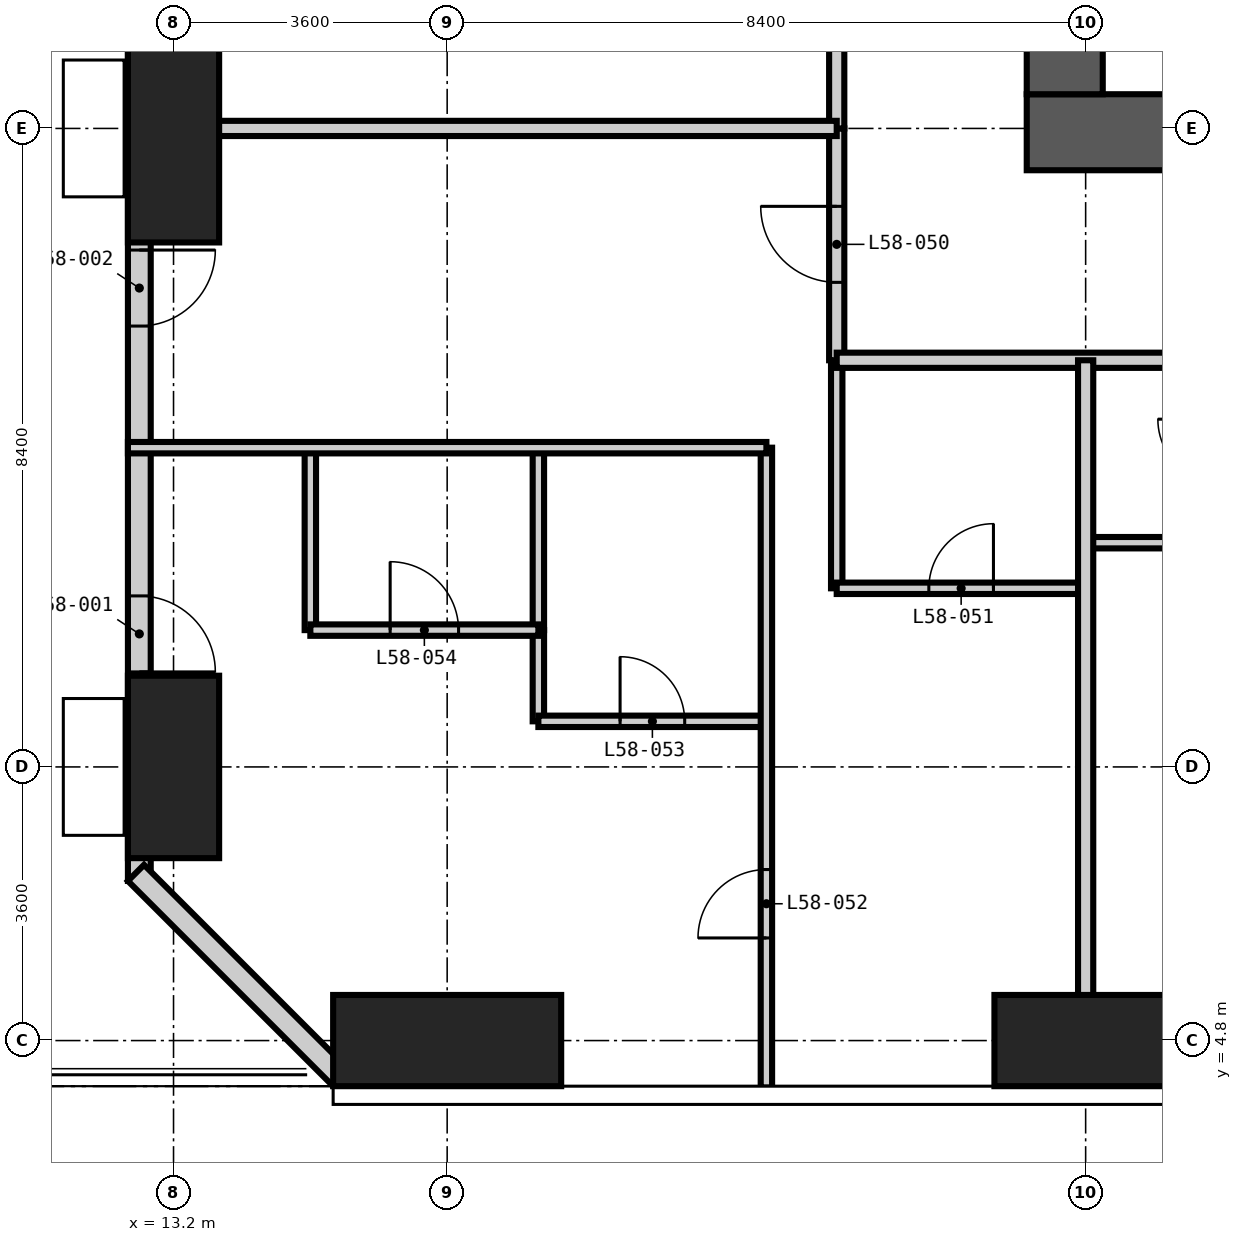
"""IFC4 building model, lengths in metres.
Left out: names, types, materials, properties, quantities, classifications, styles, units other than length and angle.
Written with IfcOpenShell. Run it as: python <this file> out.ifc"""

import sys

from ifc_helpers import new_model, si_unit, direction, frame, frame_2d, origin, origin_2d, place, context, subcontext, project, spatial, rectangle, extrude, element, fill, save


model = new_model("IFC4")
c1 = context("Model", 3, precision=1e-05, world=origin(), true_north=direction((0.0, 1.0)))
c2 = subcontext(c1, "Body", "Model", "MODEL_VIEW")
j1 = project(units=[si_unit("LENGTHUNIT", "METRE"), si_unit("PLANEANGLEUNIT", "RADIAN")], contexts=[c1])
p1 = place(None, origin())
s1 = spatial("IfcSite", under=j1, at=p1, CompositionType="ELEMENT")
p2 = place(p1, origin())
s2 = spatial("IfcBuilding", under=s1, at=p2, CompositionType="ELEMENT")
p3 = place(p2, frame((0.0, 0.0, 225.6)))
s3 = spatial("IfcBuildingStorey", under=s2, at=p3, CompositionType="ELEMENT", Elevation=225.6)
p4 = place(p3, frame((13.2, 8.4, -0.35), z_axis=(0.0, 0.0, 1.0), x_axis=(1.0, 0.0, 0.0)))
e1 = element("IfcColumn", 1, at=p4, inside=s3, PredefinedType="COLUMN", context=c2, shape_type="SweptSolid", body=[
    extrude(rectangle(XDim=1.2, YDim=2.4, at=origin_2d()), origin(), (0.0, 0.0, 1.0), 3.9),
])
p5 = place(p3, frame((13.2, 16.8, -0.35), z_axis=(0.0, 0.0, 1.0), x_axis=(1.0, 0.0, 0.0)))
e2 = element("IfcColumn", 2, at=p5, inside=s3, PredefinedType="COLUMN", context=c2, shape_type="SweptSolid", body=[
    extrude(rectangle(XDim=1.2, YDim=3.0, at=origin_2d()), origin(), (0.0, 0.0, 1.0), 3.9),
])
p6 = place(p3, frame((16.8, 4.8, -0.35), z_axis=(0.0, 0.0, 1.0), x_axis=(1.0, 0.0, 0.0)))
e3 = element("IfcColumn", 3, at=p6, inside=s3, PredefinedType="COLUMN", context=c2, shape_type="SweptSolid", body=[
    extrude(rectangle(XDim=3.0, YDim=1.2, at=origin_2d()), origin(), (0.0, 0.0, 1.0), 3.9),
])
p7 = place(p3, frame((25.2, 4.8, -0.35), z_axis=(0.0, 0.0, 1.0), x_axis=(1.0, 0.0, 0.0)))
e4 = element("IfcColumn", 4, at=p7, inside=s3, PredefinedType="COLUMN", context=c2, shape_type="SweptSolid", body=[
    extrude(rectangle(XDim=2.4, YDim=1.2, at=origin_2d()), origin(), (0.0, 0.0, 1.0), 3.9),
])
p8 = place(p3, frame((24.425, 16.75, -0.35), z_axis=(0.0, 0.0, 1.0), x_axis=(1.0, 0.0, 0.0)))
e5 = element("IfcWall", 5, at=p8, inside=s3, PredefinedType="SHEAR", context=c2, shape_type="SweptSolid", body=[
    extrude(rectangle(XDim=18.125, YDim=1.0, at=frame_2d((9.062, 0.0))), origin(), (0.0, 0.0, 1.0), 3.9),
])
p9 = place(p8, frame((4.475, 0.0, 0.35)))
e6 = element("IfcOpeningElement", 6, at=p9, cuts=e5, PredefinedType="OPENING", context=c2, shape_type="SweptSolid", body=[
    extrude(rectangle(XDim=1.0, YDim=2.1, at=frame_2d((0.5, 1.05))), frame((0.0, 0.51, 0.0), z_axis=(0.0, -1.0, 0.0), x_axis=(1.0, 0.0, 0.0)), (0.0, 0.0, 1.0), 1.02),
])
p10 = place(p8, frame((10.775, 0.0, 0.35)))
e7 = element("IfcOpeningElement", 7, at=p10, cuts=e5, PredefinedType="OPENING", context=c2, shape_type="SweptSolid", body=[
    extrude(rectangle(XDim=1.0, YDim=2.1, at=frame_2d((0.5, 1.05))), frame((0.0, 0.51, 0.0), z_axis=(0.0, -1.0, 0.0), x_axis=(1.0, 0.0, 0.0)), (0.0, 0.0, 1.0), 1.02),
])
p11 = place(p3, frame((24.925, 41.55, -0.35), z_axis=(0.0, 0.0, 1.0), x_axis=(0.0, -1.0, 0.0)))
e8 = element("IfcWall", 8, at=p11, inside=s3, PredefinedType="SHEAR", context=c2, shape_type="SweptSolid", body=[
    extrude(rectangle(XDim=24.3, YDim=1.0, at=frame_2d((12.15, 0.0))), origin(), (0.0, 0.0, 1.0), 3.9),
])
p12 = place(p11, frame((11.65, 0.0, 0.35)))
e9 = element("IfcOpeningElement", 9, at=p12, cuts=e8, PredefinedType="OPENING", context=c2, shape_type="SweptSolid", body=[
    extrude(rectangle(XDim=1.0, YDim=2.1, at=frame_2d((0.5, 1.05))), frame((0.0, 0.51, 0.0), z_axis=(0.0, -1.0, 0.0), x_axis=(1.0, 0.0, 0.0)), (0.0, 0.0, 1.0), 1.02),
])
p13 = place(p3, frame((12.75, 51.9, 0.0), z_axis=(0.0, 0.0, 1.0), x_axis=(0.0, -1.0, 0.0)))
e10 = element("IfcWall", 10, at=p13, inside=s3, PredefinedType="SOLIDWALL", context=c2, shape_type="SweptSolid", body=[
    extrude(rectangle(XDim=45.0, YDim=0.3, at=frame_2d((22.5, 0.0))), origin(), (0.0, 0.0, 1.0), 3.1),
])
p14 = place(p13, frame((41.25, 0.0, 0.0)))
e11 = element("IfcOpeningElement", 11, at=p14, cuts=e10, PredefinedType="OPENING", context=c2, shape_type="SweptSolid", body=[
    extrude(rectangle(XDim=1.0, YDim=2.4, at=frame_2d((0.5, 1.2))), frame((0.0, 0.16, 0.0), z_axis=(0.0, -1.0, 0.0), x_axis=(1.0, 0.0, 0.0)), (0.0, 0.0, 1.0), 0.32),
])
p15 = place(p13, frame((36.7, 0.0, 0.0)))
e12 = element("IfcOpeningElement", 12, at=p15, cuts=e10, PredefinedType="OPENING", context=c2, shape_type="SweptSolid", body=[
    extrude(rectangle(XDim=1.0, YDim=2.4, at=frame_2d((0.5, 1.2))), frame((0.0, 0.16, 0.0), z_axis=(0.0, -1.0, 0.0), x_axis=(1.0, 0.0, 0.0)), (0.0, 0.0, 1.0), 0.32),
])
p16 = place(p13, frame((30.4, 0.0, 0.0)))
e13 = element("IfcOpeningElement", 13, at=p16, cuts=e10, PredefinedType="OPENING", context=c2, shape_type="SweptSolid", body=[
    extrude(rectangle(XDim=1.0, YDim=2.4, at=frame_2d((0.5, 1.2))), frame((0.0, 0.16, 0.0), z_axis=(0.0, -1.0, 0.0), x_axis=(1.0, 0.0, 0.0)), (0.0, 0.0, 1.0), 0.32),
])
p17 = place(p13, frame((31.7, 0.0, 0.6)))
e14 = element("IfcOpeningElement", 14, at=p17, cuts=e10, PredefinedType="OPENING", context=c2, shape_type="SweptSolid", body=[
    extrude(rectangle(XDim=1.8, YDim=2.1, at=frame_2d((0.9, 1.05))), frame((0.0, 0.16, 0.0), z_axis=(0.0, -1.0, 0.0), x_axis=(1.0, 0.0, 0.0)), (0.0, 0.0, 1.0), 0.32),
])
p18 = place(p13, frame((28.0, 0.0, 0.6)))
e15 = element("IfcOpeningElement", 15, at=p18, cuts=e10, PredefinedType="OPENING", context=c2, shape_type="SweptSolid", body=[
    extrude(rectangle(XDim=1.8, YDim=2.1, at=frame_2d((0.9, 1.05))), frame((0.0, 0.16, 0.0), z_axis=(0.0, -1.0, 0.0), x_axis=(1.0, 0.0, 0.0)), (0.0, 0.0, 1.0), 0.32),
])
p19 = place(p13, frame((24.1, 0.0, 0.0)))
e16 = element("IfcOpeningElement", 16, at=p19, cuts=e10, PredefinedType="OPENING", context=c2, shape_type="SweptSolid", body=[
    extrude(rectangle(XDim=1.0, YDim=2.4, at=frame_2d((0.5, 1.2))), frame((0.0, 0.16, 0.0), z_axis=(0.0, -1.0, 0.0), x_axis=(1.0, 0.0, 0.0)), (0.0, 0.0, 1.0), 0.32),
])
p20 = place(p13, frame((19.9, 0.0, 0.0)))
e17 = element("IfcOpeningElement", 17, at=p20, cuts=e10, PredefinedType="OPENING", context=c2, shape_type="SweptSolid", body=[
    extrude(rectangle(XDim=1.0, YDim=2.4, at=frame_2d((0.5, 1.2))), frame((0.0, 0.16, 0.0), z_axis=(0.0, -1.0, 0.0), x_axis=(1.0, 0.0, 0.0)), (0.0, 0.0, 1.0), 0.32),
])
p21 = place(p13, frame((15.7, 0.0, 0.0)))
e18 = element("IfcOpeningElement", 18, at=p21, cuts=e10, PredefinedType="OPENING", context=c2, shape_type="SweptSolid", body=[
    extrude(rectangle(XDim=1.0, YDim=2.4, at=frame_2d((0.5, 1.2))), frame((0.0, 0.16, 0.0), z_axis=(0.0, -1.0, 0.0), x_axis=(1.0, 0.0, 0.0)), (0.0, 0.0, 1.0), 0.32),
])
p22 = place(p13, frame((11.5, 0.0, 0.0)))
e19 = element("IfcOpeningElement", 19, at=p22, cuts=e10, PredefinedType="OPENING", context=c2, shape_type="SweptSolid", body=[
    extrude(rectangle(XDim=1.0, YDim=2.4, at=frame_2d((0.5, 1.2))), frame((0.0, 0.16, 0.0), z_axis=(0.0, -1.0, 0.0), x_axis=(1.0, 0.0, 0.0)), (0.0, 0.0, 1.0), 0.32),
])
p23 = place(p13, frame((7.3, 0.0, 0.0)))
e20 = element("IfcOpeningElement", 20, at=p23, cuts=e10, PredefinedType="OPENING", context=c2, shape_type="SweptSolid", body=[
    extrude(rectangle(XDim=1.0, YDim=2.4, at=frame_2d((0.5, 1.2))), frame((0.0, 0.16, 0.0), z_axis=(0.0, -1.0, 0.0), x_axis=(1.0, 0.0, 0.0)), (0.0, 0.0, 1.0), 0.32),
])
p24 = place(p13, frame((2.75, 0.0, 0.0)))
e21 = element("IfcOpeningElement", 21, at=p24, cuts=e10, PredefinedType="OPENING", context=c2, shape_type="SweptSolid", body=[
    extrude(rectangle(XDim=1.0, YDim=2.4, at=frame_2d((0.5, 1.2))), frame((0.0, 0.16, 0.0), z_axis=(0.0, -1.0, 0.0), x_axis=(1.0, 0.0, 0.0)), (0.0, 0.0, 1.0), 0.32),
])
p25 = place(p3, frame((12.706, 7.006, 0.0), z_axis=(0.0, 0.0, 1.0), x_axis=(0.707074812166, -0.707138748762, 0.0)))
e22 = element("IfcWall", 22, at=p25, inside=s3, PredefinedType="SOLIDWALL", context=c2, shape_type="SweptSolid", body=[
    extrude(rectangle(XDim=3.818, YDim=0.3, at=frame_2d((1.909, 0.0))), origin(), (0.0, 0.0, 1.0), 3.55),
])
p26 = place(p3, frame((18.0, 9.0, 0.0), z_axis=(0.0, 0.0, 1.0), x_axis=(0.0, 1.0, 0.0)))
e23 = element("IfcWall", 23, at=p26, inside=s3, PredefinedType="PARTITIONING", context=c2, shape_type="SweptSolid", body=[
    extrude(rectangle(XDim=1.2, YDim=0.15, at=frame_2d((0.6, 0.0))), origin(), (0.0, 0.0, 1.0), 3.55),
])
p27 = place(p3, frame((21.925, 10.75, 0.0), z_axis=(0.0, 0.0, 1.0), x_axis=(0.0, 1.0, 0.0)))
e24 = element("IfcWall", 24, at=p27, inside=s3, PredefinedType="PARTITIONING", context=c2, shape_type="SweptSolid", body=[
    extrude(rectangle(XDim=3.0, YDim=0.15, at=frame_2d((1.5, 0.0))), origin(), (0.0, 0.0, 1.0), 3.55),
])
p28 = place(p3, frame((18.0, 9.0, 0.0), z_axis=(0.0, 0.0, 1.0), x_axis=(1.0, 0.0, 0.0)))
e25 = element("IfcWall", 25, at=p28, inside=s3, PredefinedType="PARTITIONING", context=c2, shape_type="SweptSolid", body=[
    extrude(rectangle(XDim=3.0, YDim=0.15, at=frame_2d((1.5, 0.0))), origin(), (0.0, 0.0, 1.0), 3.55),
])
p29 = place(p28, frame((1.075, 0.0, 0.0)))
e26 = element("IfcOpeningElement", 26, at=p29, cuts=e25, PredefinedType="OPENING", context=c2, shape_type="SweptSolid", body=[
    extrude(rectangle(XDim=0.85, YDim=2.1, at=frame_2d((0.425, 1.05))), frame((0.0, 0.085, 0.0), z_axis=(0.0, -1.0, 0.0), x_axis=(1.0, 0.0, 0.0)), (0.0, 0.0, 1.0), 0.17),
])
p30 = place(p3, frame((21.925, 10.75, 0.0), z_axis=(0.0, 0.0, 1.0), x_axis=(1.0, 0.0, 0.0)))
e27 = element("IfcWall", 27, at=p30, inside=s3, PredefinedType="PARTITIONING", context=c2, shape_type="SweptSolid", body=[
    extrude(rectangle(XDim=3.275, YDim=0.15, at=frame_2d((1.637, 0.0))), origin(), (0.0, 0.0, 1.0), 3.55),
])
p31 = place(p30, frame((1.212, 0.0, 0.0)))
e28 = element("IfcOpeningElement", 28, at=p31, cuts=e27, PredefinedType="OPENING", context=c2, shape_type="SweptSolid", body=[
    extrude(rectangle(XDim=0.85, YDim=2.1, at=frame_2d((0.425, 1.05))), frame((0.0, 0.085, 0.0), z_axis=(0.0, -1.0, 0.0), x_axis=(1.0, 0.0, 0.0)), (0.0, 0.0, 1.0), 0.17),
])
p32 = place(p3, frame((25.2, 11.35, 0.0), z_axis=(0.0, 0.0, 1.0), x_axis=(1.0, 0.0, 0.0)))
e29 = element("IfcWall", 29, at=p32, inside=s3, PredefinedType="PARTITIONING", context=c2, shape_type="SweptSolid", body=[
    extrude(rectangle(XDim=1.8, YDim=0.15, at=frame_2d((0.9, 0.0))), origin(), (0.0, 0.0, 1.0), 3.55),
])
p33 = place(p3, frame((21.925, 13.75, 0.0), z_axis=(0.0, 0.0, 1.0), x_axis=(0.0, 1.0, 0.0)))
e30 = element("IfcWall", 30, at=p33, inside=s3, PredefinedType="PARTITIONING", context=c2, shape_type="SweptSolid", body=[
    extrude(rectangle(XDim=3.05, YDim=0.2, at=frame_2d((1.525, 0.0))), origin(), (0.0, 0.0, 1.0), 3.55),
])
p34 = place(p33, frame((1.025, 0.0, 0.0)))
e31 = element("IfcOpeningElement", 31, at=p34, cuts=e30, PredefinedType="OPENING", context=c2, shape_type="SweptSolid", body=[
    extrude(rectangle(XDim=1.0, YDim=2.2, at=frame_2d((0.5, 1.1))), frame((0.0, 0.11, 0.0), z_axis=(0.0, -1.0, 0.0), x_axis=(1.0, 0.0, 0.0)), (0.0, 0.0, 1.0), 0.22),
])
p35 = place(p3, frame((21.925, 25.2, 0.0), z_axis=(0.0, 0.0, 1.0), x_axis=(0.0, -1.0, 0.0)))
e32 = element("IfcWall", 32, at=p35, inside=s3, PredefinedType="PARTITIONING", context=c2, shape_type="SweptSolid", body=[
    extrude(rectangle(XDim=8.4, YDim=0.2, at=frame_2d((4.2, 0.0))), origin(), (0.0, 0.0, 1.0), 3.55),
])
p36 = place(p35, frame((3.3, 0.0, 0.0)))
e33 = element("IfcOpeningElement", 33, at=p36, cuts=e32, PredefinedType="OPENING", context=c2, shape_type="SweptSolid", body=[
    extrude(rectangle(XDim=1.8, YDim=2.4, at=frame_2d((0.9, 1.2))), frame((0.0, 0.11, 0.0), z_axis=(0.0, -1.0, 0.0), x_axis=(1.0, 0.0, 0.0)), (0.0, 0.0, 1.0), 0.22),
])
p37 = place(p3, frame((45.65, 13.75, 0.0), z_axis=(0.0, 0.0, 1.0), x_axis=(-1.0, 0.0, 0.0)))
e34 = element("IfcWall", 34, at=p37, inside=s3, PredefinedType="PARTITIONING", context=c2, shape_type="SweptSolid", body=[
    extrude(rectangle(XDim=23.725, YDim=0.2, at=frame_2d((11.862, 0.0))), origin(), (0.0, 0.0, 1.0), 3.55),
])
p38 = place(p37, frame((16.95, 0.0, 0.0)))
e35 = element("IfcOpeningElement", 35, at=p38, cuts=e34, PredefinedType="OPENING", context=c2, shape_type="SweptSolid", body=[
    extrude(rectangle(XDim=1.0, YDim=2.2, at=frame_2d((0.5, 1.1))), frame((0.0, 0.11, 0.0), z_axis=(0.0, -1.0, 0.0), x_axis=(1.0, 0.0, 0.0)), (0.0, 0.0, 1.0), 0.22),
])
p39 = place(p37, frame((6.15, 0.0, 0.0)))
e36 = element("IfcOpeningElement", 36, at=p39, cuts=e34, PredefinedType="OPENING", context=c2, shape_type="SweptSolid", body=[
    extrude(rectangle(XDim=1.0, YDim=2.2, at=frame_2d((0.5, 1.1))), frame((0.0, 0.11, 0.0), z_axis=(0.0, -1.0, 0.0), x_axis=(1.0, 0.0, 0.0)), (0.0, 0.0, 1.0), 0.22),
])
p40 = place(p3, frame((25.2, 4.182, 0.0), z_axis=(0.0, 0.0, 1.0), x_axis=(0.0, 1.0, 0.0)))
e37 = element("IfcWall", 37, at=p40, inside=s3, PredefinedType="PARTITIONING", context=c2, shape_type="SweptSolid", body=[
    extrude(rectangle(XDim=9.568, YDim=0.2, at=frame_2d((4.784, 0.0))), origin(), (0.0, 0.0, 1.0), 3.55),
])
p41 = place(p3, frame((12.6, 16.8, 0.0), z_axis=(0.0, 0.0, 1.0), x_axis=(1.0, 0.0, 0.0)))
e38 = element("IfcWall", 38, at=p41, inside=s3, PredefinedType="PARTITIONING", context=c2, shape_type="SweptSolid", body=[
    extrude(rectangle(XDim=9.325, YDim=0.2, at=frame_2d((4.663, 0.0))), origin(), (0.0, 0.0, 1.0), 3.55),
])
for number, where, z_axis, x_axis in (
    (39, (15.0, 10.2, 0.0), (0.0, 0.0, 1.0), (0.0, 1.0, 0.0)),
    (40, (18.0, 10.2, 0.0), (0.0, 0.0, 1.0), (0.0, 1.0, 0.0)),
):
    element("IfcWall", number, at=place(p3, frame(where, z_axis=z_axis, x_axis=x_axis)), inside=s3, PredefinedType="PARTITIONING", context=c2, shape_type="SweptSolid", body=[
        extrude(rectangle(XDim=2.4, YDim=0.15, at=frame_2d((1.2, 0.0))), origin(), (0.0, 0.0, 1.0), 3.55),
    ])
p42 = place(p3, frame((21.0, 4.182, 0.0), z_axis=(0.0, 0.0, 1.0), x_axis=(0.0, 1.0, 0.0)))
e41 = element("IfcWall", 41, at=p42, inside=s3, PredefinedType="PARTITIONING", context=c2, shape_type="SweptSolid", body=[
    extrude(rectangle(XDim=8.418, YDim=0.15, at=frame_2d((4.209, 0.0))), origin(), (0.0, 0.0, 1.0), 3.55),
])
p43 = place(p42, frame((1.968, 0.0, 0.0)))
e42 = element("IfcOpeningElement", 42, at=p43, cuts=e41, PredefinedType="OPENING", context=c2, shape_type="SweptSolid", body=[
    extrude(rectangle(XDim=0.9, YDim=2.1, at=frame_2d((0.45, 1.05))), frame((0.0, 0.085, 0.0), z_axis=(0.0, -1.0, 0.0), x_axis=(1.0, 0.0, 0.0)), (0.0, 0.0, 1.0), 0.17),
])
p44 = place(p3, frame((15.0, 10.2, 0.0), z_axis=(0.0, 0.0, 1.0), x_axis=(1.0, 0.0, 0.0)))
e43 = element("IfcWall", 43, at=p44, inside=s3, PredefinedType="PARTITIONING", context=c2, shape_type="SweptSolid", body=[
    extrude(rectangle(XDim=3.0, YDim=0.15, at=frame_2d((1.5, 0.0))), origin(), (0.0, 0.0, 1.0), 3.55),
])
p45 = place(p44, frame((1.05, 0.0, 0.0)))
e44 = element("IfcOpeningElement", 44, at=p45, cuts=e43, PredefinedType="OPENING", context=c2, shape_type="SweptSolid", body=[
    extrude(rectangle(XDim=0.9, YDim=2.1, at=frame_2d((0.45, 1.05))), frame((0.0, 0.085, 0.0), z_axis=(0.0, -1.0, 0.0), x_axis=(1.0, 0.0, 0.0)), (0.0, 0.0, 1.0), 0.17),
])
p46 = place(p3, frame((12.6, 12.6, 0.0), z_axis=(0.0, 0.0, 1.0), x_axis=(1.0, 0.0, 0.0)))
e45 = element("IfcWall", 45, at=p46, inside=s3, PredefinedType="PARTITIONING", context=c2, shape_type="SweptSolid", body=[
    extrude(rectangle(XDim=8.4, YDim=0.15, at=frame_2d((4.2, 0.0))), origin(), (0.0, 0.0, 1.0), 3.55),
])
p47 = place(p14, origin())
e46 = element("IfcDoor", 46, at=p47, inside=s3, OperationType="SINGLE_SWING_RIGHT", PredefinedType="DOOR", context=c2, shape_type="SweptSolid", body=[
    extrude(rectangle(XDim=1.0, YDim=2.4, at=frame_2d((0.5, 1.2))), frame((0.0, 0.025, 0.0), z_axis=(0.0, -1.0, 0.0), x_axis=(1.0, 0.0, 0.0)), (0.0, 0.0, 1.0), 0.05),
])
fill(e11, e46)
p48 = place(p15, origin())
e47 = element("IfcDoor", 47, at=p48, inside=s3, OperationType="SINGLE_SWING_LEFT", PredefinedType="DOOR", context=c2, shape_type="SweptSolid", body=[
    extrude(rectangle(XDim=1.0, YDim=2.4, at=frame_2d((0.5, 1.2))), frame((0.0, 0.025, 0.0), z_axis=(0.0, -1.0, 0.0), x_axis=(1.0, 0.0, 0.0)), (0.0, 0.0, 1.0), 0.05),
])
fill(e12, e47)
p49 = place(p34, origin())
e48 = element("IfcDoor", 48, at=p49, inside=s3, OperationType="SINGLE_SWING_RIGHT", PredefinedType="DOOR", context=c2, shape_type="SweptSolid", body=[
    extrude(rectangle(XDim=1.0, YDim=2.2, at=frame_2d((0.5, 1.1))), frame((0.0, 0.025, 0.0), z_axis=(0.0, -1.0, 0.0), x_axis=(1.0, 0.0, 0.0)), (0.0, 0.0, 1.0), 0.05),
])
fill(e31, e48)
p50 = place(p31, origin())
e49 = element("IfcDoor", 49, at=p50, inside=s3, OperationType="SINGLE_SWING_RIGHT", PredefinedType="DOOR", context=c2, shape_type="SweptSolid", body=[
    extrude(rectangle(XDim=0.85, YDim=2.1, at=frame_2d((0.425, 1.05))), frame((0.0, 0.025, 0.0), z_axis=(0.0, -1.0, 0.0), x_axis=(1.0, 0.0, 0.0)), (0.0, 0.0, 1.0), 0.05),
])
fill(e28, e49)
p51 = place(p43, origin())
e50 = element("IfcDoor", 50, at=p51, inside=s3, OperationType="SINGLE_SWING_LEFT", PredefinedType="DOOR", context=c2, shape_type="SweptSolid", body=[
    extrude(rectangle(XDim=0.9, YDim=2.1, at=frame_2d((0.45, 1.05))), frame((0.0, 0.025, 0.0), z_axis=(0.0, -1.0, 0.0), x_axis=(1.0, 0.0, 0.0)), (0.0, 0.0, 1.0), 0.05),
])
fill(e42, e50)
p52 = place(p29, origin())
e51 = element("IfcDoor", 51, at=p52, inside=s3, OperationType="SINGLE_SWING_LEFT", PredefinedType="DOOR", context=c2, shape_type="SweptSolid", body=[
    extrude(rectangle(XDim=0.85, YDim=2.1, at=frame_2d((0.425, 1.05))), frame((0.0, 0.025, 0.0), z_axis=(0.0, -1.0, 0.0), x_axis=(1.0, 0.0, 0.0)), (0.0, 0.0, 1.0), 0.05),
])
fill(e26, e51)
p53 = place(p45, origin())
e52 = element("IfcDoor", 52, at=p53, inside=s3, OperationType="SINGLE_SWING_LEFT", PredefinedType="DOOR", context=c2, shape_type="SweptSolid", body=[
    extrude(rectangle(XDim=0.9, YDim=2.1, at=frame_2d((0.45, 1.05))), frame((0.0, 0.025, 0.0), z_axis=(0.0, -1.0, 0.0), x_axis=(1.0, 0.0, 0.0)), (0.0, 0.0, 1.0), 0.05),
])
fill(e44, e52)
save(model, sys.argv[1])
